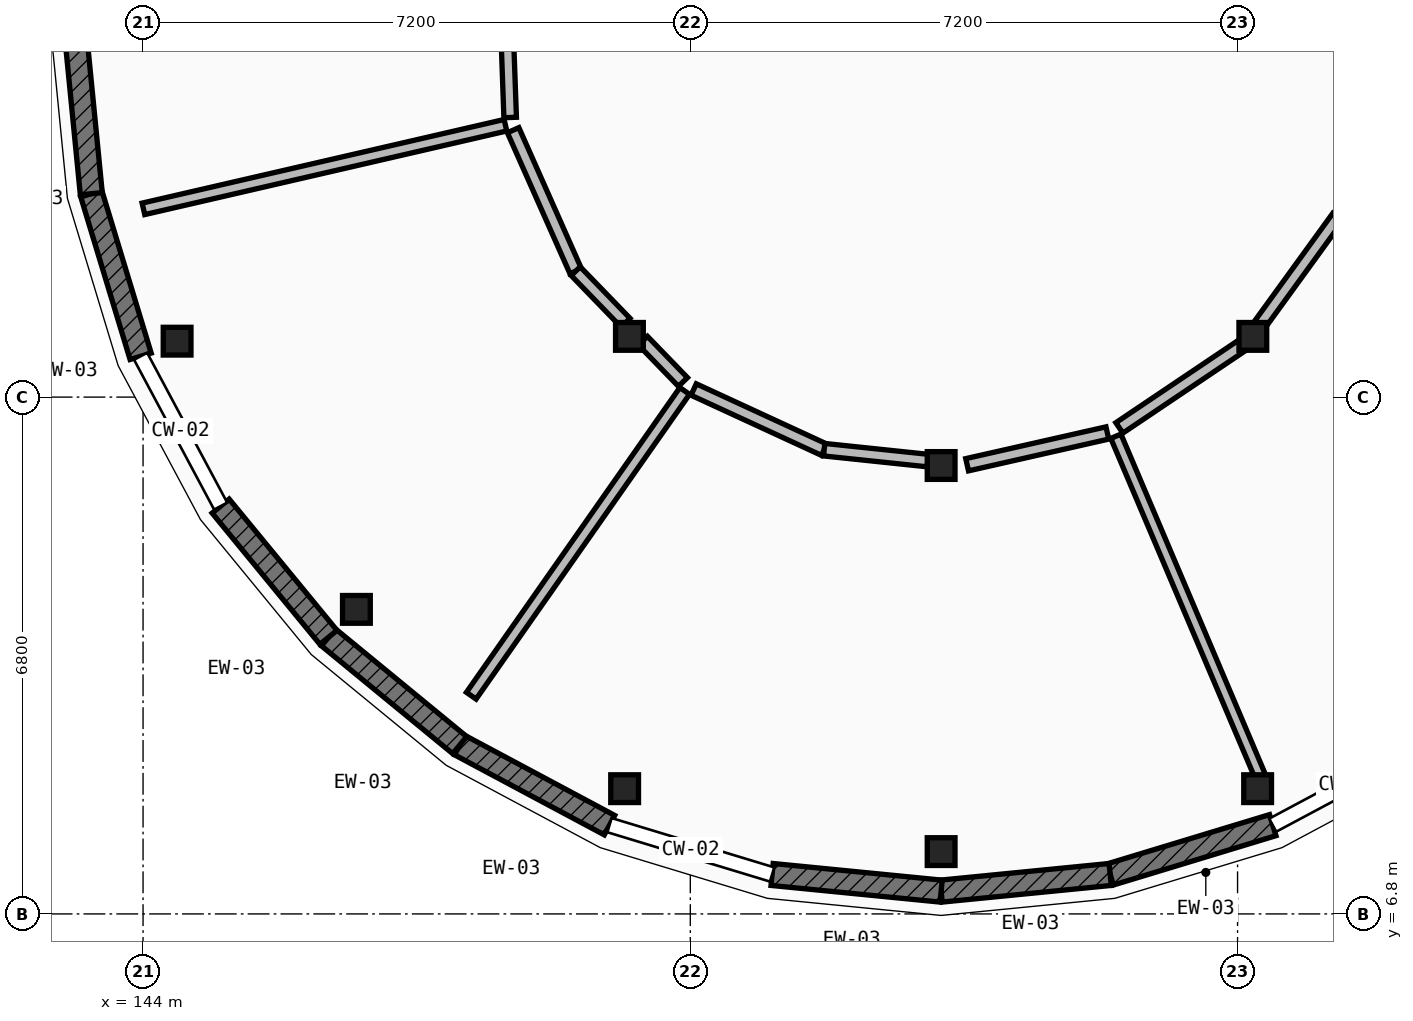
"""IFC4 building model, lengths in metres.
Left out: names, types, materials, properties, quantities, classifications, styles, units other than length and angle.
Written with IfcOpenShell. Run it as: python <this file> out.ifc"""

import sys

from ifc_helpers import new_model, si_unit, direction, frame, frame_2d, origin, origin_2d, place, context, subcontext, project, spatial, rectangle, extrude, element, fill, save


model = new_model("IFC4")
c1 = context("Model", 3, precision=1e-05, world=origin(), true_north=direction((0.0, 1.0)))
c2 = subcontext(c1, "Body", "Model", "MODEL_VIEW")
j1 = project(units=[si_unit("LENGTHUNIT", "METRE"), si_unit("PLANEANGLEUNIT", "RADIAN")], contexts=[c1])
p1 = place(None, origin())
s1 = spatial("IfcSite", under=j1, at=p1, CompositionType="ELEMENT")
p2 = place(p1, origin())
s2 = spatial("IfcBuilding", under=s1, at=p2, CompositionType="ELEMENT")
p3 = place(p2, frame((0.0, 0.0, 8.75)))
s3 = spatial("IfcBuildingStorey", under=s2, at=p3, CompositionType="ELEMENT", Elevation=8.75)
for number, where, z_axis, x_axis in (
    (1, (144.448, 14.336, 0.0), (0.0, 0.0, 1.0), (1.0, 0.0, 0.0)),
    (2, (146.807, 10.807, 0.0), (0.0, 0.0, 1.0), (1.0, 0.0, 0.0)),
    (3, (150.336, 8.448, 0.0), (0.0, 0.0, 1.0), (1.0, 0.0, 0.0)),
    (4, (154.5, 7.62, 0.0), (0.0, 0.0, 1.0), (1.0, 0.0, 0.0)),
    (5, (158.664, 8.448, 0.0), (0.0, 0.0, 1.0), (1.0, 0.0, 0.0)),
    (6, (150.399, 14.399, 0.0), (0.0, 0.0, 1.0), (1.0, 0.0, 0.0)),
    (7, (154.5, 12.7, 0.0), (0.0, 0.0, 1.0), (1.0, 0.0, 0.0)),
    (8, (158.601, 14.399, 0.0), (0.0, 0.0, 1.0), (1.0, 0.0, 0.0)),
):
    element("IfcColumn", number, at=place(p3, frame(where, z_axis=z_axis, x_axis=x_axis)), inside=s3, PredefinedType="COLUMN", context=c2, shape_type="SweptSolid", body=[
        extrude(rectangle(XDim=0.365, YDim=0.365, at=origin_2d()), origin(), (0.0, 0.0, 1.0), 4.2),
    ])
p4 = place(p3, frame((158.863, 7.968, 0.0), z_axis=(0.0, 0.0, 1.0), x_axis=(-0.956928814218, -0.290322655883, 0.0)))
e9 = element("IfcWall", 9, at=p4, inside=s3, PredefinedType="ELEMENTEDWALL", context=c2, shape_type="SweptSolid", body=[
    extrude(rectangle(XDim=2.235, YDim=0.29, at=frame_2d((1.118, 0.0))), origin(), (0.0, 0.0, 1.0), 3.314),
])
p5 = place(p4, frame((0.618, 0.0, 0.85)))
e10 = element("IfcOpeningElement", 10, at=p5, cuts=e9, PredefinedType="OPENING", context=c2, shape_type="SweptSolid", body=[
    extrude(rectangle(XDim=1.0, YDim=1.75, at=frame_2d((0.5, 0.875))), frame((0.0, 0.155, 0.0), z_axis=(0.0, -1.0, 0.0), x_axis=(1.0, 0.0, 0.0)), (0.0, 0.0, 1.0), 0.31),
])
p6 = place(p3, frame((156.724, 7.319, 0.0), z_axis=(0.0, 0.0, 1.0), x_axis=(-0.995187461503, -0.097989369151, 0.0)))
e11 = element("IfcWall", 11, at=p6, inside=s3, PredefinedType="ELEMENTEDWALL", context=c2, shape_type="SweptSolid", body=[
    extrude(rectangle(XDim=2.235, YDim=0.29, at=frame_2d((1.117, 0.0))), origin(), (0.0, 0.0, 1.0), 3.314),
])
p7 = place(p6, frame((0.617, 0.0, 0.85)))
e12 = element("IfcOpeningElement", 12, at=p7, cuts=e11, PredefinedType="OPENING", context=c2, shape_type="SweptSolid", body=[
    extrude(rectangle(XDim=1.0, YDim=2.0, at=frame_2d((0.5, 1.0))), frame((0.0, 0.155, 0.0), z_axis=(0.0, -1.0, 0.0), x_axis=(1.0, 0.0, 0.0)), (0.0, 0.0, 1.0), 0.31),
])
p8 = place(p3, frame((154.5, 7.1, 0.0), z_axis=(0.0, 0.0, 1.0), x_axis=(-0.995187461503, 0.097989369151, 0.0)))
e13 = element("IfcWall", 13, at=p8, inside=s3, PredefinedType="ELEMENTEDWALL", context=c2, shape_type="SweptSolid", body=[
    extrude(rectangle(XDim=2.235, YDim=0.29, at=frame_2d((1.117, 0.0))), origin(), (0.0, 0.0, 1.0), 3.314),
])
p9 = place(p8, frame((0.607, 0.0, 0.85)))
e14 = element("IfcOpeningElement", 14, at=p9, cuts=e13, PredefinedType="OPENING", context=c2, shape_type="SweptSolid", body=[
    extrude(rectangle(XDim=1.02, YDim=1.6, at=frame_2d((0.51, 0.8))), frame((0.0, 0.155, 0.0), z_axis=(0.0, -1.0, 0.0), x_axis=(1.0, 0.0, 0.0)), (0.0, 0.0, 1.0), 0.31),
])
p10 = place(p3, frame((150.137, 7.968, 0.0), z_axis=(0.0, 0.0, 1.0), x_axis=(-0.882017012185, 0.471217561446, 0.0)))
e15 = element("IfcWall", 15, at=p10, inside=s3, PredefinedType="ELEMENTEDWALL", context=c2, shape_type="SweptSolid", body=[
    extrude(rectangle(XDim=2.235, YDim=0.29, at=frame_2d((1.117, 0.0))), origin(), (0.0, 0.0, 1.0), 3.314),
])
p11 = place(p10, frame((0.592, 0.0, 0.85)))
e16 = element("IfcOpeningElement", 16, at=p11, cuts=e15, PredefinedType="OPENING", context=c2, shape_type="SweptSolid", body=[
    extrude(rectangle(XDim=1.05, YDim=1.35, at=frame_2d((0.525, 0.675))), frame((0.0, 0.155, 0.0), z_axis=(0.0, -1.0, 0.0), x_axis=(1.0, 0.0, 0.0)), (0.0, 0.0, 1.0), 0.31),
])
p12 = place(p3, frame((148.166, 9.021, 0.0), z_axis=(0.0, 0.0, 1.0), x_axis=(-0.772875513354, 0.63455767339, 0.0)))
e17 = element("IfcWall", 17, at=p12, inside=s3, PredefinedType="ELEMENTEDWALL", context=c2, shape_type="SweptSolid", body=[
    extrude(rectangle(XDim=2.235, YDim=0.29, at=frame_2d((1.117, 0.0))), origin(), (0.0, 0.0, 1.0), 3.314),
])
p13 = place(p12, frame((0.592, 0.0, 0.85)))
e18 = element("IfcOpeningElement", 18, at=p13, cuts=e17, PredefinedType="OPENING", context=c2, shape_type="SweptSolid", body=[
    extrude(rectangle(XDim=1.05, YDim=1.6, at=frame_2d((0.525, 0.8))), frame((0.0, 0.155, 0.0), z_axis=(0.0, -1.0, 0.0), x_axis=(1.0, 0.0, 0.0)), (0.0, 0.0, 1.0), 0.31),
])
p14 = place(p3, frame((146.439, 10.439, 0.0), z_axis=(0.0, 0.0, 1.0), x_axis=(-0.63455767339, 0.772875513354, 0.0)))
e19 = element("IfcWall", 19, at=p14, inside=s3, PredefinedType="ELEMENTEDWALL", context=c2, shape_type="SweptSolid", body=[
    extrude(rectangle(XDim=2.235, YDim=0.29, at=frame_2d((1.117, 0.0))), origin(), (0.0, 0.0, 1.0), 3.314),
])
p15 = place(p14, frame((0.592, 0.0, 0.85)))
e20 = element("IfcOpeningElement", 20, at=p15, cuts=e19, PredefinedType="OPENING", context=c2, shape_type="SweptSolid", body=[
    extrude(rectangle(XDim=1.05, YDim=1.9, at=frame_2d((0.525, 0.95))), frame((0.0, 0.155, 0.0), z_axis=(0.0, -1.0, 0.0), x_axis=(1.0, 0.0, 0.0)), (0.0, 0.0, 1.0), 0.31),
])
p16 = place(p3, frame((143.968, 14.137, 0.0), z_axis=(0.0, 0.0, 1.0), x_axis=(-0.290322655883, 0.956928814218, 0.0)))
e21 = element("IfcWall", 21, at=p16, inside=s3, PredefinedType="ELEMENTEDWALL", context=c2, shape_type="SweptSolid", body=[
    extrude(rectangle(XDim=2.235, YDim=0.29, at=frame_2d((1.118, 0.0))), origin(), (0.0, 0.0, 1.0), 3.314),
])
p17 = place(p16, frame((0.593, 0.0, 0.85)))
e22 = element("IfcOpeningElement", 22, at=p17, cuts=e21, PredefinedType="OPENING", context=c2, shape_type="SweptSolid", body=[
    extrude(rectangle(XDim=1.05, YDim=2.15, at=frame_2d((0.525, 1.075))), frame((0.0, 0.155, 0.0), z_axis=(0.0, -1.0, 0.0), x_axis=(1.0, 0.0, 0.0)), (0.0, 0.0, 1.0), 0.31),
])
p18 = place(p3, frame((143.319, 16.276, 0.0), z_axis=(0.0, 0.0, 1.0), x_axis=(-0.097989369151, 0.995187461503, 0.0)))
e23 = element("IfcWall", 23, at=p18, inside=s3, PredefinedType="ELEMENTEDWALL", context=c2, shape_type="SweptSolid", body=[
    extrude(rectangle(XDim=2.235, YDim=0.29, at=frame_2d((1.117, 0.0))), origin(), (0.0, 0.0, 1.0), 3.314),
])
p19 = place(p18, frame((0.577, 0.0, 0.85)))
e24 = element("IfcOpeningElement", 24, at=p19, cuts=e23, PredefinedType="OPENING", context=c2, shape_type="SweptSolid", body=[
    extrude(rectangle(XDim=1.08, YDim=1.5, at=frame_2d((0.54, 0.75))), frame((0.0, 0.155, 0.0), z_axis=(0.0, -1.0, 0.0), x_axis=(1.0, 0.0, 0.0)), (0.0, 0.0, 1.0), 0.31),
])
p20 = place(p3, frame((148.768, 17.177, 0.0), z_axis=(0.0, 0.0, 1.0), x_axis=(-0.974350778181, -0.225034577472, 0.0)))
e25 = element("IfcWall", 25, at=p20, inside=s3, PredefinedType="PARTITIONING", context=c2, shape_type="SweptSolid", body=[
    extrude(rectangle(XDim=4.889, YDim=0.155, at=frame_2d((2.444, 0.0))), origin(), (0.0, 0.0, 1.0), 3.279),
])
p21 = place(p3, frame((151.126, 13.681, 0.0), z_axis=(0.0, 0.0, 1.0), x_axis=(-0.573579487823, -0.819149907617, 0.0)))
e26 = element("IfcWall", 26, at=p21, inside=s3, PredefinedType="PARTITIONING", context=c2, shape_type="SweptSolid", body=[
    extrude(rectangle(XDim=4.895, YDim=0.155, at=frame_2d((2.448, 0.0))), origin(), (0.0, 0.0, 1.0), 3.279),
])
p22 = place(p3, frame((156.799, 13.085, 0.0), z_axis=(0.0, 0.0, 1.0), x_axis=(0.390680175244, -0.920526480157, 0.0)))
e27 = element("IfcWall", 27, at=p22, inside=s3, PredefinedType="PARTITIONING", context=c2, shape_type="SweptSolid", body=[
    extrude(rectangle(XDim=4.907, YDim=0.145, at=frame_2d((2.453, 0.0))), origin(), (0.0, 0.0, 1.0), 3.279),
])
p23 = place(p3, frame((148.792, 18.337, 0.0), z_axis=(0.0, 0.0, 1.0), x_axis=(0.035979458719, -0.999352529666, 0.0)))
e28 = element("IfcWall", 28, at=p23, inside=s3, PredefinedType="PARTITIONING", context=c2, shape_type="SweptSolid", body=[
    extrude(rectangle(XDim=1.059, YDim=0.165, at=frame_2d((0.529, 0.0))), origin(), (0.0, 0.0, 1.0), 3.279),
])
p24 = place(p3, frame((148.869, 17.112, 0.0), z_axis=(0.0, 0.0, 1.0), x_axis=(0.40554678001, -0.914074290867, 0.0)))
e29 = element("IfcWall", 29, at=p24, inside=s3, PredefinedType="PARTITIONING", context=c2, shape_type="SweptSolid", body=[
    extrude(rectangle(XDim=2.029, YDim=0.165, at=frame_2d((1.015, 0.0))), origin(), (0.0, 0.0, 1.0), 3.279),
])
p25 = place(p24, frame((0.515, 0.0, 0.0)))
e30 = element("IfcOpeningElement", 30, at=p25, cuts=e29, PredefinedType="OPENING", context=c2, shape_type="SweptSolid", body=[
    extrude(rectangle(XDim=1.0, YDim=2.18, at=frame_2d((0.5, 1.09))), frame((0.0, 0.093, 0.0), z_axis=(0.0, -1.0, 0.0), x_axis=(1.0, 0.0, 0.0)), (0.0, 0.0, 1.0), 0.185),
])
p26 = place(p3, frame((149.692, 15.257, 0.0), z_axis=(0.0, 0.0, 1.0), x_axis=(0.695365384634, -0.718656372582, 0.0)))
e31 = element("IfcWall", 31, at=p26, inside=s3, PredefinedType="PARTITIONING", context=c2, shape_type="SweptSolid", body=[
    extrude(rectangle(XDim=0.943, YDim=0.165, at=frame_2d((0.472, 0.0))), origin(), (0.0, 0.0, 1.0), 3.279),
])
p27 = place(p3, frame((150.577, 14.342, 0.0), z_axis=(0.0, 0.0, 1.0), x_axis=(0.695878501673, -0.718159530265, 0.0)))
e32 = element("IfcWall", 32, at=p27, inside=s3, PredefinedType="PARTITIONING", context=c2, shape_type="SweptSolid", body=[
    extrude(rectangle(XDim=0.756, YDim=0.165, at=frame_2d((0.378, 0.0))), origin(), (0.0, 0.0, 1.0), 3.279),
])
p28 = place(p3, frame((151.244, 13.7, 0.0), z_axis=(0.0, 0.0, 1.0), x_axis=(0.908057612025, -0.418845285569, 0.0)))
e33 = element("IfcWall", 33, at=p28, inside=s3, PredefinedType="PARTITIONING", context=c2, shape_type="SweptSolid", body=[
    extrude(rectangle(XDim=1.891, YDim=0.165, at=frame_2d((0.945, 0.0))), origin(), (0.0, 0.0, 1.0), 3.279),
])
p29 = place(p28, frame((0.416, 0.0, 0.0)))
e34 = element("IfcOpeningElement", 34, at=p29, cuts=e33, PredefinedType="OPENING", context=c2, shape_type="SweptSolid", body=[
    extrude(rectangle(XDim=1.06, YDim=2.2, at=frame_2d((0.53, 1.1))), frame((0.0, 0.093, 0.0), z_axis=(0.0, -1.0, 0.0), x_axis=(1.0, 0.0, 0.0)), (0.0, 0.0, 1.0), 0.185),
])
p30 = place(p3, frame((152.961, 12.908, 0.0), z_axis=(0.0, 0.0, 1.0), x_axis=(0.994536643564, -0.104388048205, 0.0)))
e35 = element("IfcWall", 35, at=p30, inside=s3, PredefinedType="PARTITIONING", context=c2, shape_type="SweptSolid", body=[
    extrude(rectangle(XDim=1.371, YDim=0.165, at=frame_2d((0.685, 0.0))), origin(), (0.0, 0.0, 1.0), 3.279),
])
p31 = place(p3, frame((154.842, 12.71, 0.0), z_axis=(0.0, 0.0, 1.0), x_axis=(0.975286020369, 0.220946098567, 0.0)))
e36 = element("IfcWall", 36, at=p31, inside=s3, PredefinedType="PARTITIONING", context=c2, shape_type="SweptSolid", body=[
    extrude(rectangle(XDim=1.892, YDim=0.165, at=frame_2d((0.946, 0.0))), origin(), (0.0, 0.0, 1.0), 3.279),
])
p32 = place(p3, frame((156.845, 13.195, 0.0), z_axis=(0.0, 0.0, 1.0), x_axis=(0.829839559262, 0.558002066201, 0.0)))
e37 = element("IfcWall", 37, at=p32, inside=s3, PredefinedType="PARTITIONING", context=c2, shape_type="SweptSolid", body=[
    extrude(rectangle(XDim=1.943, YDim=0.165, at=frame_2d((0.971, 0.0))), origin(), (0.0, 0.0, 1.0), 3.279),
])
p33 = place(p32, frame((0.511, 0.0, 0.0)))
e38 = element("IfcOpeningElement", 38, at=p33, cuts=e37, PredefinedType="OPENING", context=c2, shape_type="SweptSolid", body=[
    extrude(rectangle(XDim=0.92, YDim=2.12, at=frame_2d((0.46, 1.06))), frame((0.0, 0.093, 0.0), z_axis=(0.0, -1.0, 0.0), x_axis=(1.0, 0.0, 0.0)), (0.0, 0.0, 1.0), 0.185),
])
p34 = place(p3, frame((158.697, 14.56, 0.0), z_axis=(0.0, 0.0, 1.0), x_axis=(0.586988232211, 0.809595463949, 0.0)))
e39 = element("IfcWall", 39, at=p34, inside=s3, PredefinedType="PARTITIONING", context=c2, shape_type="SweptSolid", body=[
    extrude(rectangle(XDim=1.743, YDim=0.165, at=frame_2d((0.871, 0.0))), origin(), (0.0, 0.0, 1.0), 3.279),
])
p35 = place(p5, origin())
e40 = element("IfcWindow", 40, at=p35, inside=s3, PartitioningType="SINGLE_PANEL", PredefinedType="WINDOW", context=c2, shape_type="SweptSolid", body=[
    extrude(rectangle(XDim=1.0, YDim=1.75, at=frame_2d((0.5, 0.875))), frame((0.0, 0.03, 0.0), z_axis=(0.0, -1.0, 0.0), x_axis=(1.0, 0.0, 0.0)), (0.0, 0.0, 1.0), 0.06),
])
fill(e10, e40)
p36 = place(p7, origin())
e41 = element("IfcWindow", 41, at=p36, inside=s3, PartitioningType="SINGLE_PANEL", PredefinedType="WINDOW", context=c2, shape_type="SweptSolid", body=[
    extrude(rectangle(XDim=1.0, YDim=2.0, at=frame_2d((0.5, 1.0))), frame((0.0, 0.03, 0.0), z_axis=(0.0, -1.0, 0.0), x_axis=(1.0, 0.0, 0.0)), (0.0, 0.0, 1.0), 0.06),
])
fill(e12, e41)
p37 = place(p9, origin())
e42 = element("IfcWindow", 42, at=p37, inside=s3, PartitioningType="SINGLE_PANEL", PredefinedType="WINDOW", context=c2, shape_type="SweptSolid", body=[
    extrude(rectangle(XDim=1.02, YDim=1.6, at=frame_2d((0.51, 0.8))), frame((0.0, 0.03, 0.0), z_axis=(0.0, -1.0, 0.0), x_axis=(1.0, 0.0, 0.0)), (0.0, 0.0, 1.0), 0.06),
])
fill(e14, e42)
p38 = place(p11, origin())
e43 = element("IfcWindow", 43, at=p38, inside=s3, PartitioningType="SINGLE_PANEL", PredefinedType="WINDOW", context=c2, shape_type="SweptSolid", body=[
    extrude(rectangle(XDim=1.05, YDim=1.35, at=frame_2d((0.525, 0.675))), frame((0.0, 0.03, 0.0), z_axis=(0.0, -1.0, 0.0), x_axis=(1.0, 0.0, 0.0)), (0.0, 0.0, 1.0), 0.06),
])
fill(e16, e43)
p39 = place(p13, origin())
e44 = element("IfcWindow", 44, at=p39, inside=s3, PartitioningType="SINGLE_PANEL", PredefinedType="WINDOW", context=c2, shape_type="SweptSolid", body=[
    extrude(rectangle(XDim=1.05, YDim=1.6, at=frame_2d((0.525, 0.8))), frame((0.0, 0.03, 0.0), z_axis=(0.0, -1.0, 0.0), x_axis=(1.0, 0.0, 0.0)), (0.0, 0.0, 1.0), 0.06),
])
fill(e18, e44)
p40 = place(p15, origin())
e45 = element("IfcWindow", 45, at=p40, inside=s3, PartitioningType="SINGLE_PANEL", PredefinedType="WINDOW", context=c2, shape_type="SweptSolid", body=[
    extrude(rectangle(XDim=1.05, YDim=1.9, at=frame_2d((0.525, 0.95))), frame((0.0, 0.03, 0.0), z_axis=(0.0, -1.0, 0.0), x_axis=(1.0, 0.0, 0.0)), (0.0, 0.0, 1.0), 0.06),
])
fill(e20, e45)
p41 = place(p17, origin())
e46 = element("IfcWindow", 46, at=p41, inside=s3, PartitioningType="SINGLE_PANEL", PredefinedType="WINDOW", context=c2, shape_type="SweptSolid", body=[
    extrude(rectangle(XDim=1.05, YDim=2.15, at=frame_2d((0.525, 1.075))), frame((0.0, 0.03, 0.0), z_axis=(0.0, -1.0, 0.0), x_axis=(1.0, 0.0, 0.0)), (0.0, 0.0, 1.0), 0.06),
])
fill(e22, e46)
p42 = place(p19, origin())
e47 = element("IfcWindow", 47, at=p42, inside=s3, PartitioningType="SINGLE_PANEL", PredefinedType="WINDOW", context=c2, shape_type="SweptSolid", body=[
    extrude(rectangle(XDim=1.08, YDim=1.5, at=frame_2d((0.54, 0.75))), frame((0.0, 0.03, 0.0), z_axis=(0.0, -1.0, 0.0), x_axis=(1.0, 0.0, 0.0)), (0.0, 0.0, 1.0), 0.06),
])
fill(e24, e47)
p43 = place(p25, origin())
e48 = element("IfcDoor", 48, at=p43, inside=s3, OperationType="SINGLE_SWING_RIGHT", PredefinedType="DOOR", context=c2, shape_type="SweptSolid", body=[
    extrude(rectangle(XDim=1.0, YDim=2.18, at=frame_2d((0.5, 1.09))), frame((0.0, 0.025, 0.0), z_axis=(0.0, -1.0, 0.0), x_axis=(1.0, 0.0, 0.0)), (0.0, 0.0, 1.0), 0.05),
])
fill(e30, e48)
p44 = place(p29, origin())
e49 = element("IfcDoor", 49, at=p44, inside=s3, OperationType="SINGLE_SWING_LEFT", PredefinedType="DOOR", context=c2, shape_type="SweptSolid", body=[
    extrude(rectangle(XDim=1.06, YDim=2.2, at=frame_2d((0.53, 1.1))), frame((0.0, 0.025, 0.0), z_axis=(0.0, -1.0, 0.0), x_axis=(1.0, 0.0, 0.0)), (0.0, 0.0, 1.0), 0.05),
])
fill(e34, e49)
p45 = place(p33, origin())
e50 = element("IfcDoor", 50, at=p45, inside=s3, OperationType="SINGLE_SWING_RIGHT", PredefinedType="DOOR", context=c2, shape_type="SweptSolid", body=[
    extrude(rectangle(XDim=0.92, YDim=2.12, at=frame_2d((0.46, 1.06))), frame((0.0, 0.025, 0.0), z_axis=(0.0, -1.0, 0.0), x_axis=(1.0, 0.0, 0.0)), (0.0, 0.0, 1.0), 0.05),
])
fill(e38, e50)
save(model, sys.argv[1])
